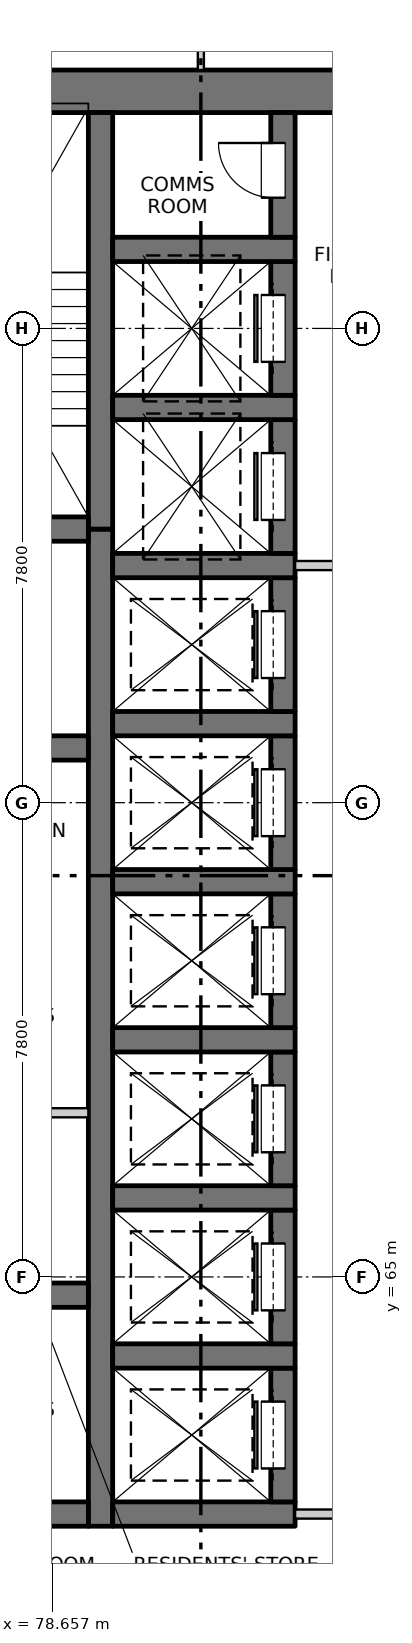
"""IFC4 building model, lengths in metres.
Left out: names, types, materials, properties, quantities, classifications, styles, units other than length and angle.
Written with IfcOpenShell. Run it as: python <this file> out.ifc"""

import sys

from ifc_helpers import new_model, si_unit, direction, frame, frame_2d, origin, place, context, subcontext, project, spatial, rectangle, extrude, element, fill, save


model = new_model("IFC4")
c1 = context("Model", 3, precision=1e-05, world=origin(), true_north=direction((0.0, 1.0)))
c2 = subcontext(c1, "Body", "Model", "MODEL_VIEW")
j1 = project(units=[si_unit("LENGTHUNIT", "METRE"), si_unit("PLANEANGLEUNIT", "RADIAN")], contexts=[c1])
p1 = place(None, origin())
s1 = spatial("IfcSite", under=j1, at=p1, CompositionType="ELEMENT")
p2 = place(p1, origin())
s2 = spatial("IfcBuilding", under=s1, at=p2, CompositionType="ELEMENT")
p3 = place(p2, frame((0.0, 0.0, 26.3)))
s3 = spatial("IfcBuildingStorey", under=s2, at=p3, CompositionType="ELEMENT", Elevation=26.3)
p4 = place(p3, frame((75.6, 84.5, -0.25), z_axis=(0.0, 0.0, 1.0), x_axis=(1.0, 0.0, 0.0)))
e1 = element("IfcWall", 1, at=p4, inside=s3, PredefinedType="SOLIDWALL", context=c2, shape_type="SweptSolid", body=[
    extrude(rectangle(XDim=18.8, YDim=0.7, at=frame_2d((9.4, 0.0))), origin(), (0.0, 0.0, 1.0), 3.4),
])
p5 = place(p3, frame((79.45, 60.9, -0.25), z_axis=(0.0, 0.0, 1.0), x_axis=(0.0, 1.0, 0.0)))
e2 = element("IfcWall", 2, at=p5, inside=s3, PredefinedType="SOLIDWALL", context=c2, shape_type="SweptSolid", body=[
    extrude(rectangle(XDim=16.4, YDim=0.4, at=frame_2d((8.2, 0.0))), origin(), (0.0, 0.0, 1.0), 3.4),
])
p6 = place(p3, frame((79.45, 77.3, -0.25), z_axis=(0.0, 0.0, 1.0), x_axis=(0.0, 1.0, 0.0)))
e3 = element("IfcWall", 3, at=p6, inside=s3, PredefinedType="SOLIDWALL", context=c2, shape_type="SweptSolid", body=[
    extrude(rectangle(XDim=6.85, YDim=0.4, at=frame_2d((3.425, 0.0))), origin(), (0.0, 0.0, 1.0), 3.4),
])
p7 = place(p3, frame((79.65, 61.1, -0.25), z_axis=(0.0, 0.0, 1.0), x_axis=(1.0, 0.0, 0.0)))
e4 = element("IfcWall", 4, at=p7, inside=s3, PredefinedType="SOLIDWALL", context=c2, shape_type="SweptSolid", body=[
    extrude(rectangle(XDim=3.0, YDim=0.4, at=frame_2d((1.5, 0.0))), origin(), (0.0, 0.0, 1.0), 3.4),
])
p8 = place(p3, frame((82.45, 61.3, -0.25), z_axis=(0.0, 0.0, 1.0), x_axis=(0.0, 1.0, 0.0)))
e5 = element("IfcWall", 5, at=p8, inside=s3, PredefinedType="SOLIDWALL", context=c2, shape_type="SweptSolid", body=[
    extrude(rectangle(XDim=2.2, YDim=0.4, at=frame_2d((1.1, 0.0))), origin(), (0.0, 0.0, 1.0), 3.4),
])
p9 = place(p8, frame((0.55, 0.0, 0.25)))
e6 = element("IfcOpeningElement", 6, at=p9, cuts=e5, PredefinedType="OPENING", context=c2, shape_type="SweptSolid", body=[
    extrude(rectangle(XDim=1.1, YDim=2.1, at=frame_2d((0.55, 1.05))), frame((0.0, 0.21, 0.0), z_axis=(0.0, -1.0, 0.0), x_axis=(1.0, 0.0, 0.0)), (0.0, 0.0, 1.0), 0.42),
])
p10 = place(p3, frame((79.65, 63.7, -0.25), z_axis=(0.0, 0.0, 1.0), x_axis=(1.0, 0.0, 0.0)))
e7 = element("IfcWall", 7, at=p10, inside=s3, PredefinedType="SOLIDWALL", context=c2, shape_type="SweptSolid", body=[
    extrude(rectangle(XDim=3.0, YDim=0.4, at=frame_2d((1.5, 0.0))), origin(), (0.0, 0.0, 1.0), 3.4),
])
p11 = place(p3, frame((82.45, 63.9, -0.25), z_axis=(0.0, 0.0, 1.0), x_axis=(0.0, 1.0, 0.0)))
e8 = element("IfcWall", 8, at=p11, inside=s3, PredefinedType="SOLIDWALL", context=c2, shape_type="SweptSolid", body=[
    extrude(rectangle(XDim=2.2, YDim=0.4, at=frame_2d((1.1, 0.0))), origin(), (0.0, 0.0, 1.0), 3.4),
])
p12 = place(p11, frame((0.55, 0.0, 0.25)))
e9 = element("IfcOpeningElement", 9, at=p12, cuts=e8, PredefinedType="OPENING", context=c2, shape_type="SweptSolid", body=[
    extrude(rectangle(XDim=1.1, YDim=2.1, at=frame_2d((0.55, 1.05))), frame((0.0, 0.21, 0.0), z_axis=(0.0, -1.0, 0.0), x_axis=(1.0, 0.0, 0.0)), (0.0, 0.0, 1.0), 0.42),
])
p13 = place(p3, frame((79.65, 66.3, -0.25), z_axis=(0.0, 0.0, 1.0), x_axis=(1.0, 0.0, 0.0)))
e10 = element("IfcWall", 10, at=p13, inside=s3, PredefinedType="SOLIDWALL", context=c2, shape_type="SweptSolid", body=[
    extrude(rectangle(XDim=3.0, YDim=0.4, at=frame_2d((1.5, 0.0))), origin(), (0.0, 0.0, 1.0), 3.4),
])
p14 = place(p3, frame((82.45, 66.5, -0.25), z_axis=(0.0, 0.0, 1.0), x_axis=(0.0, 1.0, 0.0)))
e11 = element("IfcWall", 11, at=p14, inside=s3, PredefinedType="SOLIDWALL", context=c2, shape_type="SweptSolid", body=[
    extrude(rectangle(XDim=2.2, YDim=0.4, at=frame_2d((1.1, 0.0))), origin(), (0.0, 0.0, 1.0), 3.4),
])
p15 = place(p14, frame((0.55, 0.0, 0.25)))
e12 = element("IfcOpeningElement", 12, at=p15, cuts=e11, PredefinedType="OPENING", context=c2, shape_type="SweptSolid", body=[
    extrude(rectangle(XDim=1.1, YDim=2.1, at=frame_2d((0.55, 1.05))), frame((0.0, 0.21, 0.0), z_axis=(0.0, -1.0, 0.0), x_axis=(1.0, 0.0, 0.0)), (0.0, 0.0, 1.0), 0.42),
])
p16 = place(p3, frame((79.65, 68.9, -0.25), z_axis=(0.0, 0.0, 1.0), x_axis=(1.0, 0.0, 0.0)))
e13 = element("IfcWall", 13, at=p16, inside=s3, PredefinedType="SOLIDWALL", context=c2, shape_type="SweptSolid", body=[
    extrude(rectangle(XDim=3.0, YDim=0.4, at=frame_2d((1.5, 0.0))), origin(), (0.0, 0.0, 1.0), 3.4),
])
p17 = place(p3, frame((82.45, 69.1, -0.25), z_axis=(0.0, 0.0, 1.0), x_axis=(0.0, 1.0, 0.0)))
e14 = element("IfcWall", 14, at=p17, inside=s3, PredefinedType="SOLIDWALL", context=c2, shape_type="SweptSolid", body=[
    extrude(rectangle(XDim=2.2, YDim=0.4, at=frame_2d((1.1, 0.0))), origin(), (0.0, 0.0, 1.0), 3.4),
])
p18 = place(p17, frame((0.55, 0.0, 0.25)))
e15 = element("IfcOpeningElement", 15, at=p18, cuts=e14, PredefinedType="OPENING", context=c2, shape_type="SweptSolid", body=[
    extrude(rectangle(XDim=1.1, YDim=2.1, at=frame_2d((0.55, 1.05))), frame((0.0, 0.21, 0.0), z_axis=(0.0, -1.0, 0.0), x_axis=(1.0, 0.0, 0.0)), (0.0, 0.0, 1.0), 0.42),
])
p19 = place(p3, frame((79.65, 71.5, -0.25), z_axis=(0.0, 0.0, 1.0), x_axis=(1.0, 0.0, 0.0)))
e16 = element("IfcWall", 16, at=p19, inside=s3, PredefinedType="SOLIDWALL", context=c2, shape_type="SweptSolid", body=[
    extrude(rectangle(XDim=3.0, YDim=0.4, at=frame_2d((1.5, 0.0))), origin(), (0.0, 0.0, 1.0), 3.4),
])
p20 = place(p3, frame((82.45, 71.7, -0.25), z_axis=(0.0, 0.0, 1.0), x_axis=(0.0, 1.0, 0.0)))
e17 = element("IfcWall", 17, at=p20, inside=s3, PredefinedType="SOLIDWALL", context=c2, shape_type="SweptSolid", body=[
    extrude(rectangle(XDim=2.2, YDim=0.4, at=frame_2d((1.1, 0.0))), origin(), (0.0, 0.0, 1.0), 3.4),
])
p21 = place(p20, frame((0.55, 0.0, 0.25)))
e18 = element("IfcOpeningElement", 18, at=p21, cuts=e17, PredefinedType="OPENING", context=c2, shape_type="SweptSolid", body=[
    extrude(rectangle(XDim=1.1, YDim=2.1, at=frame_2d((0.55, 1.05))), frame((0.0, 0.21, 0.0), z_axis=(0.0, -1.0, 0.0), x_axis=(1.0, 0.0, 0.0)), (0.0, 0.0, 1.0), 0.42),
])
p22 = place(p3, frame((79.65, 74.1, -0.25), z_axis=(0.0, 0.0, 1.0), x_axis=(1.0, 0.0, 0.0)))
e19 = element("IfcWall", 19, at=p22, inside=s3, PredefinedType="SOLIDWALL", context=c2, shape_type="SweptSolid", body=[
    extrude(rectangle(XDim=3.0, YDim=0.4, at=frame_2d((1.5, 0.0))), origin(), (0.0, 0.0, 1.0), 3.4),
])
p23 = place(p3, frame((82.45, 74.3, -0.25), z_axis=(0.0, 0.0, 1.0), x_axis=(0.0, 1.0, 0.0)))
e20 = element("IfcWall", 20, at=p23, inside=s3, PredefinedType="SOLIDWALL", context=c2, shape_type="SweptSolid", body=[
    extrude(rectangle(XDim=2.2, YDim=0.4, at=frame_2d((1.1, 0.0))), origin(), (0.0, 0.0, 1.0), 3.4),
])
p24 = place(p23, frame((0.55, 0.0, 0.25)))
e21 = element("IfcOpeningElement", 21, at=p24, cuts=e20, PredefinedType="OPENING", context=c2, shape_type="SweptSolid", body=[
    extrude(rectangle(XDim=1.1, YDim=2.1, at=frame_2d((0.55, 1.05))), frame((0.0, 0.21, 0.0), z_axis=(0.0, -1.0, 0.0), x_axis=(1.0, 0.0, 0.0)), (0.0, 0.0, 1.0), 0.42),
])
p25 = place(p3, frame((79.65, 76.7, -0.25), z_axis=(0.0, 0.0, 1.0), x_axis=(1.0, 0.0, 0.0)))
e22 = element("IfcWall", 22, at=p25, inside=s3, PredefinedType="SOLIDWALL", context=c2, shape_type="SweptSolid", body=[
    extrude(rectangle(XDim=3.0, YDim=0.4, at=frame_2d((1.5, 0.0))), origin(), (0.0, 0.0, 1.0), 3.4),
])
p26 = place(p3, frame((82.45, 76.9, -0.25), z_axis=(0.0, 0.0, 1.0), x_axis=(0.0, 1.0, 0.0)))
e23 = element("IfcWall", 23, at=p26, inside=s3, PredefinedType="SOLIDWALL", context=c2, shape_type="SweptSolid", body=[
    extrude(rectangle(XDim=2.2, YDim=0.4, at=frame_2d((1.1, 0.0))), origin(), (0.0, 0.0, 1.0), 3.4),
])
p27 = place(p26, frame((0.55, 0.0, 0.25)))
e24 = element("IfcOpeningElement", 24, at=p27, cuts=e23, PredefinedType="OPENING", context=c2, shape_type="SweptSolid", body=[
    extrude(rectangle(XDim=1.1, YDim=2.1, at=frame_2d((0.55, 1.05))), frame((0.0, 0.21, 0.0), z_axis=(0.0, -1.0, 0.0), x_axis=(1.0, 0.0, 0.0)), (0.0, 0.0, 1.0), 0.42),
])
p28 = place(p3, frame((79.65, 79.3, -0.25), z_axis=(0.0, 0.0, 1.0), x_axis=(1.0, 0.0, 0.0)))
e25 = element("IfcWall", 25, at=p28, inside=s3, PredefinedType="SOLIDWALL", context=c2, shape_type="SweptSolid", body=[
    extrude(rectangle(XDim=3.0, YDim=0.4, at=frame_2d((1.5, 0.0))), origin(), (0.0, 0.0, 1.0), 3.4),
])
p29 = place(p3, frame((82.45, 79.5, -0.25), z_axis=(0.0, 0.0, 1.0), x_axis=(0.0, 1.0, 0.0)))
e26 = element("IfcWall", 26, at=p29, inside=s3, PredefinedType="SOLIDWALL", context=c2, shape_type="SweptSolid", body=[
    extrude(rectangle(XDim=2.2, YDim=0.4, at=frame_2d((1.1, 0.0))), origin(), (0.0, 0.0, 1.0), 3.4),
])
p30 = place(p29, frame((0.55, 0.0, 0.25)))
e27 = element("IfcOpeningElement", 27, at=p30, cuts=e26, PredefinedType="OPENING", context=c2, shape_type="SweptSolid", body=[
    extrude(rectangle(XDim=1.1, YDim=2.1, at=frame_2d((0.55, 1.05))), frame((0.0, 0.21, 0.0), z_axis=(0.0, -1.0, 0.0), x_axis=(1.0, 0.0, 0.0)), (0.0, 0.0, 1.0), 0.42),
])
p31 = place(p3, frame((79.65, 81.9, -0.25), z_axis=(0.0, 0.0, 1.0), x_axis=(1.0, 0.0, 0.0)))
e28 = element("IfcWall", 28, at=p31, inside=s3, PredefinedType="SOLIDWALL", context=c2, shape_type="SweptSolid", body=[
    extrude(rectangle(XDim=3.0, YDim=0.4, at=frame_2d((1.5, 0.0))), origin(), (0.0, 0.0, 1.0), 3.4),
])
p32 = place(p3, frame((82.45, 82.1, -0.25), z_axis=(0.0, 0.0, 1.0), x_axis=(0.0, 1.0, 0.0)))
e29 = element("IfcWall", 29, at=p32, inside=s3, PredefinedType="SOLIDWALL", context=c2, shape_type="SweptSolid", body=[
    extrude(rectangle(XDim=2.05, YDim=0.4, at=frame_2d((1.025, 0.0))), origin(), (0.0, 0.0, 1.0), 3.4),
])
p33 = place(p32, frame((0.65, 0.0, 0.25)))
e30 = element("IfcOpeningElement", 30, at=p33, cuts=e29, PredefinedType="OPENING", context=c2, shape_type="SweptSolid", body=[
    extrude(rectangle(XDim=0.9, YDim=2.1, at=frame_2d((0.45, 1.05))), frame((0.0, 0.21, 0.0), z_axis=(0.0, -1.0, 0.0), x_axis=(1.0, 0.0, 0.0)), (0.0, 0.0, 1.0), 0.42),
])
for number, where, z_axis, x_axis in (
    (31, (75.6, 61.1, -0.25), (0.0, 0.0, 1.0), (1.0, 0.0, 0.0)),
    (32, (75.6, 64.7, -0.25), (0.0, 0.0, 1.0), (1.0, 0.0, 0.0)),
    (33, (75.6, 73.7, -0.25), (0.0, 0.0, 1.0), (1.0, 0.0, 0.0)),
    (34, (75.6, 77.3, -0.25), (0.0, 0.0, 1.0), (1.0, 0.0, 0.0)),
):
    element("IfcWall", number, at=place(p3, frame(where, z_axis=z_axis, x_axis=x_axis)), inside=s3, PredefinedType="SOLIDWALL", context=c2, shape_type="SweptSolid", body=[
        extrude(rectangle(XDim=3.65, YDim=0.4, at=frame_2d((1.825, 0.0))), origin(), (0.0, 0.0, 1.0), 3.4),
    ])
p34 = place(p3, frame((82.65, 61.1, 0.0), z_axis=(0.0, 0.0, 1.0), x_axis=(1.0, 0.0, 0.0)))
e35 = element("IfcWall", 35, at=p34, inside=s3, PredefinedType="PARTITIONING", context=c2, shape_type="SweptSolid", body=[
    extrude(rectangle(XDim=4.7, YDim=0.15, at=frame_2d((2.35, 0.0))), origin(), (0.0, 0.0, 1.0), 3.15),
])
p35 = place(p34, frame((1.45, 0.0, 0.0)))
e36 = element("IfcOpeningElement", 36, at=p35, cuts=e35, PredefinedType="OPENING", context=c2, shape_type="SweptSolid", body=[
    extrude(rectangle(XDim=1.8, YDim=2.1, at=frame_2d((0.9, 1.05))), frame((0.0, 0.085, 0.0), z_axis=(0.0, -1.0, 0.0), x_axis=(1.0, 0.0, 0.0)), (0.0, 0.0, 1.0), 0.17),
])
p36 = place(p3, frame((75.6, 67.7, 0.0), z_axis=(0.0, 0.0, 1.0), x_axis=(1.0, 0.0, 0.0)))
e37 = element("IfcWall", 37, at=p36, inside=s3, PredefinedType="PARTITIONING", context=c2, shape_type="SweptSolid", body=[
    extrude(rectangle(XDim=3.65, YDim=0.15, at=frame_2d((1.825, 0.0))), origin(), (0.0, 0.0, 1.0), 3.15),
])
p37 = place(p3, frame((82.65, 76.7, 0.0), z_axis=(0.0, 0.0, 1.0), x_axis=(1.0, 0.0, 0.0)))
e38 = element("IfcWall", 38, at=p37, inside=s3, PredefinedType="PARTITIONING", context=c2, shape_type="SweptSolid", body=[
    extrude(rectangle(XDim=4.7, YDim=0.15, at=frame_2d((2.35, 0.0))), origin(), (0.0, 0.0, 1.0), 3.15),
])
p38 = place(p37, frame((1.45, 0.0, 0.0)))
e39 = element("IfcOpeningElement", 39, at=p38, cuts=e38, PredefinedType="OPENING", context=c2, shape_type="SweptSolid", body=[
    extrude(rectangle(XDim=1.8, YDim=2.1, at=frame_2d((0.9, 1.05))), frame((0.0, 0.085, 0.0), z_axis=(0.0, -1.0, 0.0), x_axis=(1.0, 0.0, 0.0)), (0.0, 0.0, 1.0), 0.17),
])
p39 = place(p3, frame((81.1, 84.85, 0.0), z_axis=(0.0, 0.0, 1.0), x_axis=(0.0, 1.0, 0.0)))
e40 = element("IfcWall", 40, at=p39, inside=s3, PredefinedType="PARTITIONING", context=c2, shape_type="SweptSolid", body=[
    extrude(rectangle(XDim=3.25, YDim=0.1, at=frame_2d((1.625, 0.0))), origin(), (0.0, 0.0, 1.0), 3.15),
])
p40 = place(p39, frame((1.15, 0.0, 0.0)))
e41 = element("IfcOpeningElement", 41, at=p40, cuts=e40, PredefinedType="OPENING", context=c2, shape_type="SweptSolid", body=[
    extrude(rectangle(XDim=0.9, YDim=2.1, at=frame_2d((0.45, 1.05))), frame((0.0, 0.06, 0.0), z_axis=(0.0, -1.0, 0.0), x_axis=(1.0, 0.0, 0.0)), (0.0, 0.0, 1.0), 0.12),
])
p41 = place(p9, origin())
e42 = element("IfcDoor", 42, at=p41, inside=s3, OperationType="SLIDING_TO_RIGHT", PredefinedType="DOOR", context=c2, shape_type="SweptSolid", body=[
    extrude(rectangle(XDim=1.1, YDim=2.1, at=frame_2d((0.55, 1.05))), frame((0.0, 0.185, 0.0), z_axis=(0.0, -1.0, 0.0), x_axis=(1.0, 0.0, 0.0)), (0.0, 0.0, 1.0), 0.05),
])
fill(e6, e42)
p42 = place(p12, origin())
e43 = element("IfcDoor", 43, at=p42, inside=s3, OperationType="SLIDING_TO_RIGHT", PredefinedType="DOOR", context=c2, shape_type="SweptSolid", body=[
    extrude(rectangle(XDim=1.1, YDim=2.1, at=frame_2d((0.55, 1.05))), frame((0.0, 0.185, 0.0), z_axis=(0.0, -1.0, 0.0), x_axis=(1.0, 0.0, 0.0)), (0.0, 0.0, 1.0), 0.05),
])
fill(e9, e43)
p43 = place(p15, origin())
e44 = element("IfcDoor", 44, at=p43, inside=s3, OperationType="SLIDING_TO_RIGHT", PredefinedType="DOOR", context=c2, shape_type="SweptSolid", body=[
    extrude(rectangle(XDim=1.1, YDim=2.1, at=frame_2d((0.55, 1.05))), frame((0.0, 0.185, 0.0), z_axis=(0.0, -1.0, 0.0), x_axis=(1.0, 0.0, 0.0)), (0.0, 0.0, 1.0), 0.05),
])
fill(e12, e44)
p44 = place(p18, origin())
e45 = element("IfcDoor", 45, at=p44, inside=s3, OperationType="SLIDING_TO_LEFT", PredefinedType="DOOR", context=c2, shape_type="SweptSolid", body=[
    extrude(rectangle(XDim=1.1, YDim=2.1, at=frame_2d((0.55, 1.05))), frame((0.0, 0.185, 0.0), z_axis=(0.0, -1.0, 0.0), x_axis=(1.0, 0.0, 0.0)), (0.0, 0.0, 1.0), 0.05),
])
fill(e15, e45)
p45 = place(p21, origin())
e46 = element("IfcDoor", 46, at=p45, inside=s3, OperationType="SLIDING_TO_LEFT", PredefinedType="DOOR", context=c2, shape_type="SweptSolid", body=[
    extrude(rectangle(XDim=1.1, YDim=2.1, at=frame_2d((0.55, 1.05))), frame((0.0, 0.185, 0.0), z_axis=(0.0, -1.0, 0.0), x_axis=(1.0, 0.0, 0.0)), (0.0, 0.0, 1.0), 0.05),
])
fill(e18, e46)
p46 = place(p24, origin())
e47 = element("IfcDoor", 47, at=p46, inside=s3, OperationType="SLIDING_TO_LEFT", PredefinedType="DOOR", context=c2, shape_type="SweptSolid", body=[
    extrude(rectangle(XDim=1.1, YDim=2.1, at=frame_2d((0.55, 1.05))), frame((0.0, 0.185, 0.0), z_axis=(0.0, -1.0, 0.0), x_axis=(1.0, 0.0, 0.0)), (0.0, 0.0, 1.0), 0.05),
])
fill(e21, e47)
p47 = place(p27, origin())
e48 = element("IfcDoor", 48, at=p47, inside=s3, OperationType="SLIDING_TO_LEFT", PredefinedType="DOOR", context=c2, shape_type="SweptSolid", body=[
    extrude(rectangle(XDim=1.1, YDim=2.1, at=frame_2d((0.55, 1.05))), frame((0.0, 0.185, 0.0), z_axis=(0.0, -1.0, 0.0), x_axis=(1.0, 0.0, 0.0)), (0.0, 0.0, 1.0), 0.05),
])
fill(e24, e48)
p48 = place(p30, origin())
e49 = element("IfcDoor", 49, at=p48, inside=s3, OperationType="SLIDING_TO_LEFT", PredefinedType="DOOR", context=c2, shape_type="SweptSolid", body=[
    extrude(rectangle(XDim=1.1, YDim=2.1, at=frame_2d((0.55, 1.05))), frame((0.0, 0.185, 0.0), z_axis=(0.0, -1.0, 0.0), x_axis=(1.0, 0.0, 0.0)), (0.0, 0.0, 1.0), 0.05),
])
fill(e27, e49)
p49 = place(p33, origin())
e50 = element("IfcDoor", 50, at=p49, inside=s3, OperationType="SINGLE_SWING_RIGHT", PredefinedType="DOOR", context=c2, shape_type="SweptSolid", body=[
    extrude(rectangle(XDim=0.9, YDim=2.1, at=frame_2d((0.45, 1.05))), frame((0.0, 0.185, 0.0), z_axis=(0.0, -1.0, 0.0), x_axis=(1.0, 0.0, 0.0)), (0.0, 0.0, 1.0), 0.05),
])
fill(e30, e50)
save(model, sys.argv[1])
